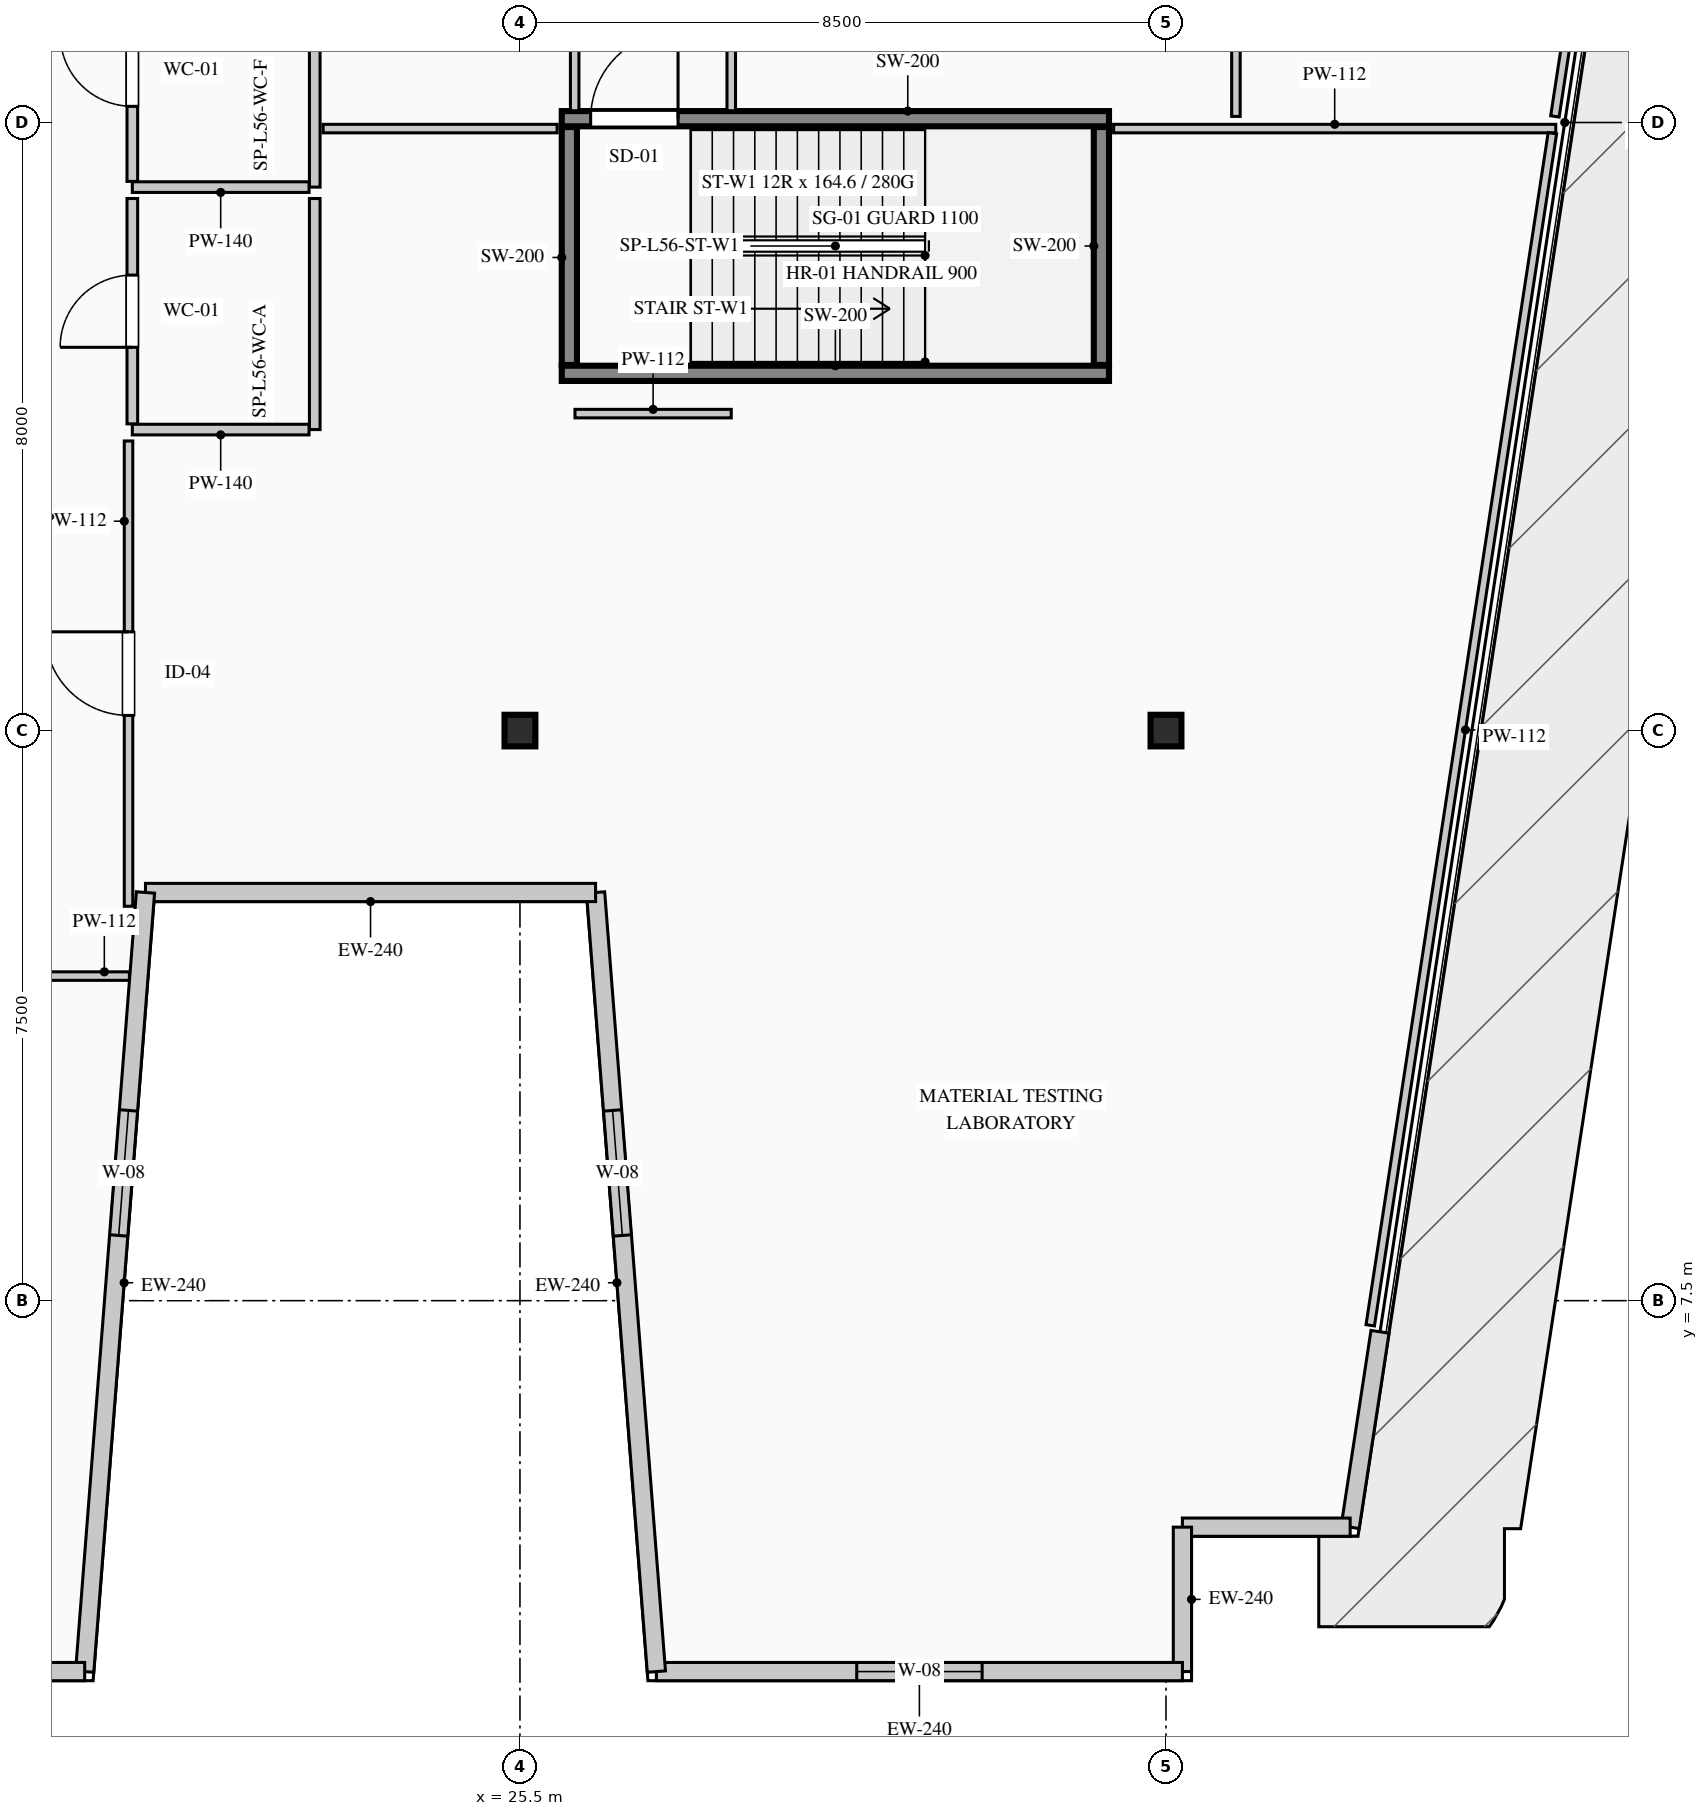
"""IFC4 building model, lengths in metres.
Left out: names, types, materials, properties, quantities, classifications, styles, units other than length and angle.
Written with IfcOpenShell. Run it as: python <this file> out.ifc"""

import sys

from ifc_helpers import new_model, si_unit, direction, frame, frame_2d, origin, origin_2d, place, context, subcontext, project, spatial, rectangle, i_section, extrude, element, fill, save


model = new_model("IFC4")
c1 = context("Model", 3, precision=1e-05, world=origin(), true_north=direction((0.0, 1.0)))
c2 = subcontext(c1, "Body", "Model", "MODEL_VIEW")
j1 = project(units=[si_unit("LENGTHUNIT", "METRE"), si_unit("PLANEANGLEUNIT", "RADIAN")], contexts=[c1])
p1 = place(None, origin())
s1 = spatial("IfcSite", under=j1, at=p1, CompositionType="ELEMENT")
p2 = place(p1, origin())
s2 = spatial("IfcBuilding", under=s1, at=p2, CompositionType="ELEMENT")
p3 = place(p2, frame((0.0, 0.0, 235.1)))
s3 = spatial("IfcBuildingStorey", under=s2, at=p3, CompositionType="ELEMENT", Elevation=235.1)
p4 = place(p3, frame((26.05, 19.7, 0.0), z_axis=(0.0, 0.0, 1.0), x_axis=(1.0, 0.0, 0.0)))
e1 = element("IfcWall", 1, at=p4, inside=s3, PredefinedType="SHEAR", context=c2, shape_type="SweptSolid", body=[
    extrude(rectangle(XDim=7.2, YDim=0.2, at=frame_2d((3.6, 0.0))), origin(), (0.0, 0.0, 1.0), 3.95),
])
p5 = place(p3, frame((26.05, 23.05, 0.0), z_axis=(0.0, 0.0, 1.0), x_axis=(1.0, 0.0, 0.0)))
e2 = element("IfcWall", 2, at=p5, inside=s3, PredefinedType="SHEAR", context=c2, shape_type="SweptSolid", body=[
    extrude(rectangle(XDim=7.2, YDim=0.2, at=frame_2d((3.6, 0.0))), origin(), (0.0, 0.0, 1.0), 3.95),
])
p6 = place(p5, frame((0.38, 0.0, 0.0)))
e3 = element("IfcOpeningElement", 3, at=p6, cuts=e2, PredefinedType="OPENING", context=c2, shape_type="SweptSolid", body=[
    extrude(rectangle(XDim=1.15, YDim=2.2, at=frame_2d((0.575, 1.1))), frame((0.0, 0.11, 0.0), z_axis=(0.0, -1.0, 0.0), x_axis=(1.0, 0.0, 0.0)), (0.0, 0.0, 1.0), 0.22),
])
for number, where, z_axis, x_axis in (
    (4, (26.15, 19.81, 0.0), (0.0, 0.0, 1.0), (0.0, 1.0, 0.0)),
    (5, (33.15, 19.81, 0.0), (0.0, 0.0, 1.0), (0.0, 1.0, 0.0)),
):
    element("IfcWall", number, at=place(p3, frame(where, z_axis=z_axis, x_axis=x_axis)), inside=s3, PredefinedType="SHEAR", context=c2, shape_type="SweptSolid", body=[
        extrude(rectangle(XDim=3.13, YDim=0.2, at=frame_2d((1.565, 0.0))), origin(), (0.0, 0.0, 1.0), 3.95),
    ])
for number, where, z_axis, x_axis in (
    (6, (25.5, 15.0, 0.0), (0.0, 0.0, 1.0), (1.0, 0.0, 0.0)),
    (7, (34.0, 15.0, 0.0), (0.0, 0.0, 1.0), (1.0, 0.0, 0.0)),
):
    element("IfcColumn", number, at=place(p3, frame(where, z_axis=z_axis, x_axis=x_axis)), inside=s3, PredefinedType="COLUMN", context=c2, shape_type="SweptSolid", body=[
        extrude(i_section(OverallWidth=0.406, OverallDepth=0.416, WebThickness=0.03, FlangeThickness=0.048, FilletRadius=0.015, at=origin_2d()), origin(), (0.0, 0.0, 1.0), 3.95),
    ])
p7 = place(p3, frame((36.816, 7.09, 0.0), z_axis=(0.0, 0.0, 1.0), x_axis=(-0.151090396132, -0.988519950328, 0.0)))
e8 = element("IfcWall", 8, at=p7, inside=s3, PredefinedType="STANDARD", context=c2, shape_type="SweptSolid", body=[
    extrude(rectangle(XDim=2.6, YDim=0.24, at=frame_2d((1.3, 0.0))), origin(), (0.0, 0.0, 1.0), 3.7),
])
p8 = place(p3, frame((36.423, 4.52, 0.0), z_axis=(0.0, 0.0, 1.0), x_axis=(-1.0, 0.0, 0.0)))
e9 = element("IfcWall", 9, at=p8, inside=s3, PredefinedType="STANDARD", context=c2, shape_type="SweptSolid", body=[
    extrude(rectangle(XDim=2.207, YDim=0.24, at=frame_2d((1.104, 0.0))), origin(), (0.0, 0.0, 1.0), 3.7),
])
p9 = place(p3, frame((34.216, 4.52, 0.0), z_axis=(0.0, 0.0, 1.0), x_axis=(0.0, -1.0, 0.0)))
e10 = element("IfcWall", 10, at=p9, inside=s3, PredefinedType="STANDARD", context=c2, shape_type="SweptSolid", body=[
    extrude(rectangle(XDim=1.9, YDim=0.24, at=frame_2d((0.95, 0.0))), origin(), (0.0, 0.0, 1.0), 3.7),
])
p10 = place(p3, frame((34.216, 2.62, 0.0), z_axis=(0.0, 0.0, 1.0), x_axis=(-1.0, 0.0, 0.0)))
e11 = element("IfcWall", 11, at=p10, inside=s3, PredefinedType="STANDARD", context=c2, shape_type="SweptSolid", body=[
    extrude(rectangle(XDim=6.921, YDim=0.24, at=frame_2d((3.46, 0.0))), origin(), (0.0, 0.0, 1.0), 3.7),
])
p11 = place(p10, frame((2.635, 0.0, 0.9)))
e12 = element("IfcOpeningElement", 12, at=p11, cuts=e11, PredefinedType="OPENING", context=c2, shape_type="SweptSolid", body=[
    extrude(rectangle(XDim=1.65, YDim=1.95, at=frame_2d((0.825, 0.975))), frame((0.0, 0.13, 0.0), z_axis=(0.0, -1.0, 0.0), x_axis=(1.0, 0.0, 0.0)), (0.0, 0.0, 1.0), 0.26),
])
p12 = place(p3, frame((27.295, 2.62, 0.0), z_axis=(0.0, 0.0, 1.0), x_axis=(-0.077793257511, 0.996969512616, 0.0)))
e13 = element("IfcWall", 13, at=p12, inside=s3, PredefinedType="STANDARD", context=c2, shape_type="SweptSolid", body=[
    extrude(rectangle(XDim=10.281, YDim=0.24, at=frame_2d((5.141, 0.0))), origin(), (0.0, 0.0, 1.0), 3.7),
])
p13 = place(p12, frame((5.755, 0.0, 0.9)))
e14 = element("IfcOpeningElement", 14, at=p13, cuts=e13, PredefinedType="OPENING", context=c2, shape_type="SweptSolid", body=[
    extrude(rectangle(XDim=1.65, YDim=1.95, at=frame_2d((0.825, 0.975))), frame((0.0, 0.13, 0.0), z_axis=(0.0, -1.0, 0.0), x_axis=(1.0, 0.0, 0.0)), (0.0, 0.0, 1.0), 0.26),
])
p14 = place(p3, frame((26.495, 12.87, 0.0), z_axis=(0.0, 0.0, 1.0), x_axis=(-1.0, 0.0, 0.0)))
e15 = element("IfcWall", 15, at=p14, inside=s3, PredefinedType="STANDARD", context=c2, shape_type="SweptSolid", body=[
    extrude(rectangle(XDim=5.922, YDim=0.24, at=frame_2d((2.961, 0.0))), origin(), (0.0, 0.0, 1.0), 3.7),
])
p15 = place(p3, frame((20.573, 12.87, 0.0), z_axis=(0.0, 0.0, 1.0), x_axis=(-0.077816860153, -0.996967670627, 0.0)))
e16 = element("IfcWall", 16, at=p15, inside=s3, PredefinedType="STANDARD", context=c2, shape_type="SweptSolid", body=[
    extrude(rectangle(XDim=10.281, YDim=0.24, at=frame_2d((5.141, 0.0))), origin(), (0.0, 0.0, 1.0), 3.7),
])
p16 = place(p15, frame((2.876, 0.0, 0.9)))
e17 = element("IfcOpeningElement", 17, at=p16, cuts=e16, PredefinedType="OPENING", context=c2, shape_type="SweptSolid", body=[
    extrude(rectangle(XDim=1.65, YDim=1.95, at=frame_2d((0.825, 0.975))), frame((0.0, 0.13, 0.0), z_axis=(0.0, -1.0, 0.0), x_axis=(1.0, 0.0, 0.0)), (0.0, 0.0, 1.0), 0.26),
])
p17 = place(p3, frame((19.773, 2.62, 0.0), z_axis=(0.0, 0.0, 1.0), x_axis=(-1.0, 0.0, 0.0)))
e18 = element("IfcWall", 18, at=p17, inside=s3, PredefinedType="STANDARD", context=c2, shape_type="SweptSolid", body=[
    extrude(rectangle(XDim=10.717, YDim=0.24, at=frame_2d((5.358, 0.0))), origin(), (0.0, 0.0, 1.0), 3.7),
])
p18 = place(p17, frame((4.659, 0.0, 0.0)))
e19 = element("IfcOpeningElement", 19, at=p18, cuts=e18, PredefinedType="OPENING", context=c2, shape_type="SweptSolid", body=[
    extrude(rectangle(XDim=1.4, YDim=2.2, at=frame_2d((0.7, 1.1))), frame((0.0, 0.13, 0.0), z_axis=(0.0, -1.0, 0.0), x_axis=(1.0, 0.0, 0.0)), (0.0, 0.0, 1.0), 0.26),
])
p19 = place(p3, frame((22.8, 25.15, 0.0), z_axis=(0.0, 0.0, 1.0), x_axis=(0.0, -1.0, 0.0)))
e20 = element("IfcWall", 20, at=p19, inside=s3, PredefinedType="PARTITIONING", context=c2, shape_type="SweptSolid", body=[
    extrude(rectangle(XDim=3.0, YDim=0.14, at=frame_2d((1.5, 0.0))), origin(), (0.0, 0.0, 1.0), 3.325),
])
p20 = place(p3, frame((22.725, 22.15, 0.0), z_axis=(0.0, 0.0, 1.0), x_axis=(-1.0, 0.0, 0.0)))
e21 = element("IfcWall", 21, at=p20, inside=s3, PredefinedType="PARTITIONING", context=c2, shape_type="SweptSolid", body=[
    extrude(rectangle(XDim=2.325, YDim=0.14, at=frame_2d((1.163, 0.0))), origin(), (0.0, 0.0, 1.0), 3.7),
])
p21 = place(p3, frame((20.4, 22.225, 0.0), z_axis=(0.0, 0.0, 1.0), x_axis=(0.0, 1.0, 0.0)))
e22 = element("IfcWall", 22, at=p21, inside=s3, PredefinedType="PARTITIONING", context=c2, shape_type="SweptSolid", body=[
    extrude(rectangle(XDim=2.925, YDim=0.14, at=frame_2d((1.462, 0.0))), origin(), (0.0, 0.0, 1.0), 3.7),
])
p22 = place(p21, frame((0.988, 0.0, 0.0)))
e23 = element("IfcOpeningElement", 23, at=p22, cuts=e22, PredefinedType="OPENING", context=c2, shape_type="SweptSolid", body=[
    extrude(rectangle(XDim=0.95, YDim=2.15, at=frame_2d((0.475, 1.075))), frame((0.0, 0.08, 0.0), z_axis=(0.0, -1.0, 0.0), x_axis=(1.0, 0.0, 0.0)), (0.0, 0.0, 1.0), 0.16),
])
p23 = place(p3, frame((22.8, 22.0, 0.0), z_axis=(0.0, 0.0, 1.0), x_axis=(0.0, -1.0, 0.0)))
e24 = element("IfcWall", 24, at=p23, inside=s3, PredefinedType="PARTITIONING", context=c2, shape_type="SweptSolid", body=[
    extrude(rectangle(XDim=3.04, YDim=0.14, at=frame_2d((1.52, 0.0))), origin(), (0.0, 0.0, 1.0), 3.325),
])
p24 = place(p3, frame((22.725, 18.96, 0.0), z_axis=(0.0, 0.0, 1.0), x_axis=(-1.0, 0.0, 0.0)))
e25 = element("IfcWall", 25, at=p24, inside=s3, PredefinedType="PARTITIONING", context=c2, shape_type="SweptSolid", body=[
    extrude(rectangle(XDim=2.325, YDim=0.14, at=frame_2d((1.163, 0.0))), origin(), (0.0, 0.0, 1.0), 3.7),
])
p25 = place(p3, frame((20.4, 19.035, 0.0), z_axis=(0.0, 0.0, 1.0), x_axis=(0.0, 1.0, 0.0)))
e26 = element("IfcWall", 26, at=p25, inside=s3, PredefinedType="PARTITIONING", context=c2, shape_type="SweptSolid", body=[
    extrude(rectangle(XDim=2.965, YDim=0.14, at=frame_2d((1.482, 0.0))), origin(), (0.0, 0.0, 1.0), 3.7),
])
p26 = place(p25, frame((1.008, 0.0, 0.0)))
e27 = element("IfcOpeningElement", 27, at=p26, cuts=e26, PredefinedType="OPENING", context=c2, shape_type="SweptSolid", body=[
    extrude(rectangle(XDim=0.95, YDim=2.15, at=frame_2d((0.475, 1.075))), frame((0.0, 0.08, 0.0), z_axis=(0.0, -1.0, 0.0), x_axis=(1.0, 0.0, 0.0)), (0.0, 0.0, 1.0), 0.16),
])
p27 = place(p3, frame((17.141, 11.77, 0.0), z_axis=(0.0, 0.0, 1.0), x_axis=(1.0, 0.0, 0.0)))
e28 = element("IfcWall", 28, at=p27, inside=s3, PredefinedType="PARTITIONING", context=c2, shape_type="SweptSolid", body=[
    extrude(rectangle(XDim=3.221, YDim=0.112, at=frame_2d((1.61, 0.0))), origin(), (0.0, 0.0, 1.0), 3.7),
])
p28 = place(p27, frame((1.06, 0.0, 0.0)))
e29 = element("IfcOpeningElement", 29, at=p28, cuts=e28, PredefinedType="OPENING", context=c2, shape_type="SweptSolid", body=[
    extrude(rectangle(XDim=1.1, YDim=2.2, at=frame_2d((0.55, 1.1))), frame((0.0, 0.066, 0.0), z_axis=(0.0, -1.0, 0.0), x_axis=(1.0, 0.0, 0.0)), (0.0, 0.0, 1.0), 0.132),
])
p29 = place(p3, frame((33.311, 22.92, 0.0), z_axis=(0.0, 0.0, 1.0), x_axis=(1.0, 0.0, 0.0)))
e30 = element("IfcWall", 30, at=p29, inside=s3, PredefinedType="PARTITIONING", context=c2, shape_type="SweptSolid", body=[
    extrude(rectangle(XDim=5.817, YDim=0.112, at=frame_2d((2.909, 0.0))), origin(), (0.0, 0.0, 1.0), 3.7),
])
p30 = place(p3, frame((39.084, 22.859, 0.0), z_axis=(0.0, 0.0, 1.0), x_axis=(-0.151051087355, -0.988525957681, 0.0)))
e31 = element("IfcWall", 31, at=p30, inside=s3, PredefinedType="PARTITIONING", context=c2, shape_type="SweptSolid", body=[
    extrude(rectangle(XDim=15.865, YDim=0.112, at=frame_2d((7.933, 0.0))), origin(), (0.0, 0.0, 1.0), 3.7),
])
p31 = place(p3, frame((20.35, 12.689, 0.0), z_axis=(0.0, 0.0, 1.0), x_axis=(0.0, 1.0, 0.0)))
e32 = element("IfcWall", 32, at=p31, inside=s3, PredefinedType="PARTITIONING", context=c2, shape_type="SweptSolid", body=[
    extrude(rectangle(XDim=6.121, YDim=0.112, at=frame_2d((3.061, 0.0))), origin(), (0.0, 0.0, 1.0), 3.7),
])
p32 = place(p31, frame((2.511, 0.0, 0.0)))
e33 = element("IfcOpeningElement", 33, at=p32, cuts=e32, PredefinedType="OPENING", context=c2, shape_type="SweptSolid", body=[
    extrude(rectangle(XDim=1.1, YDim=2.2, at=frame_2d((0.55, 1.1))), frame((0.0, 0.066, 0.0), z_axis=(0.0, -1.0, 0.0), x_axis=(1.0, 0.0, 0.0)), (0.0, 0.0, 1.0), 0.132),
])
p33 = place(p3, frame((22.91, 22.92, 0.0), z_axis=(0.0, 0.0, 1.0), x_axis=(1.0, 0.0, 0.0)))
e34 = element("IfcWall", 34, at=p33, inside=s3, PredefinedType="PARTITIONING", context=c2, shape_type="SweptSolid", body=[
    extrude(rectangle(XDim=3.079, YDim=0.112, at=frame_2d((1.54, 0.0))), origin(), (0.0, 0.0, 1.0), 3.7),
])
p34 = place(p3, frame((26.224, 19.17, 0.0), z_axis=(0.0, 0.0, 1.0), x_axis=(1.0, 0.0, 0.0)))
e35 = element("IfcWall", 35, at=p34, inside=s3, PredefinedType="PARTITIONING", context=c2, shape_type="SweptSolid", body=[
    extrude(rectangle(XDim=2.056, YDim=0.112, at=frame_2d((1.028, 0.0))), origin(), (0.0, 0.0, 1.0), 3.7),
])
p35 = place(p3, frame((26.22, 28.959, 0.0), z_axis=(0.0, 0.0, 1.0), x_axis=(0.0, -1.0, 0.0)))
e36 = element("IfcWall", 36, at=p35, inside=s3, PredefinedType="PARTITIONING", context=c2, shape_type="SweptSolid", body=[
    extrude(rectangle(XDim=5.804, YDim=0.112, at=frame_2d((2.902, 0.0))), origin(), (0.0, 0.0, 1.0), 3.7),
])
p36 = place(p35, frame((2.352, 0.0, 0.0)))
e37 = element("IfcOpeningElement", 37, at=p36, cuts=e36, PredefinedType="OPENING", context=c2, shape_type="SweptSolid", body=[
    extrude(rectangle(XDim=1.1, YDim=2.2, at=frame_2d((0.55, 1.1))), frame((0.0, 0.066, 0.0), z_axis=(0.0, -1.0, 0.0), x_axis=(1.0, 0.0, 0.0)), (0.0, 0.0, 1.0), 0.132),
])
p37 = place(p3, frame((28.28, 23.155, 0.0), z_axis=(0.0, 0.0, 1.0), x_axis=(0.0, 1.0, 0.0)))
e38 = element("IfcWall", 38, at=p37, inside=s3, PredefinedType="PARTITIONING", context=c2, shape_type="SweptSolid", body=[
    extrude(rectangle(XDim=5.865, YDim=0.112, at=frame_2d((2.933, 0.0))), origin(), (0.0, 0.0, 1.0), 3.7),
])
p38 = place(p3, frame((34.92, 28.959, 0.0), z_axis=(0.0, 0.0, 1.0), x_axis=(0.0, -1.0, 0.0)))
e39 = element("IfcWall", 39, at=p38, inside=s3, PredefinedType="PARTITIONING", context=c2, shape_type="SweptSolid", body=[
    extrude(rectangle(XDim=5.879, YDim=0.112, at=frame_2d((2.939, 0.0))), origin(), (0.0, 0.0, 1.0), 3.7),
])
p39 = place(p3, frame((41.529, 38.867, 0.0), z_axis=(0.0, 0.0, 1.0), x_axis=(-0.151041582551, -0.98852741001, 0.0)))
e40 = element("IfcWall", 40, at=p39, inside=s3, PredefinedType="PARTITIONING", context=c2, shape_type="SweptSolid", body=[
    extrude(rectangle(XDim=15.97, YDim=0.112, at=frame_2d((7.985, 0.0))), origin(), (0.0, 0.0, 1.0), 3.7),
])
p40 = place(p11, origin())
e41 = element("IfcWindow", 41, at=p40, inside=s3, PartitioningType="SINGLE_PANEL", PredefinedType="WINDOW", context=c2, shape_type="SweptSolid", body=[
    extrude(rectangle(XDim=1.65, YDim=1.95, at=frame_2d((0.825, 0.975))), frame((0.0, 0.03, 0.0), z_axis=(0.0, -1.0, 0.0), x_axis=(1.0, 0.0, 0.0)), (0.0, 0.0, 1.0), 0.06),
])
fill(e12, e41)
p41 = place(p13, origin())
e42 = element("IfcWindow", 42, at=p41, inside=s3, PartitioningType="SINGLE_PANEL", PredefinedType="WINDOW", context=c2, shape_type="SweptSolid", body=[
    extrude(rectangle(XDim=1.65, YDim=1.95, at=frame_2d((0.825, 0.975))), frame((0.0, 0.03, 0.0), z_axis=(0.0, -1.0, 0.0), x_axis=(1.0, 0.0, 0.0)), (0.0, 0.0, 1.0), 0.06),
])
fill(e14, e42)
p42 = place(p16, origin())
e43 = element("IfcWindow", 43, at=p42, inside=s3, PartitioningType="SINGLE_PANEL", PredefinedType="WINDOW", context=c2, shape_type="SweptSolid", body=[
    extrude(rectangle(XDim=1.65, YDim=1.95, at=frame_2d((0.825, 0.975))), frame((0.0, 0.03, 0.0), z_axis=(0.0, -1.0, 0.0), x_axis=(1.0, 0.0, 0.0)), (0.0, 0.0, 1.0), 0.06),
])
fill(e17, e43)
p43 = place(p6, origin())
e44 = element("IfcDoor", 44, at=p43, inside=s3, OperationType="SINGLE_SWING_RIGHT", PredefinedType="DOOR", context=c2, shape_type="SweptSolid", body=[
    extrude(rectangle(XDim=1.15, YDim=2.2, at=frame_2d((0.575, 1.1))), frame((0.0, 0.025, 0.0), z_axis=(0.0, -1.0, 0.0), x_axis=(1.0, 0.0, 0.0)), (0.0, 0.0, 1.0), 0.05),
])
fill(e3, e44)
p44 = place(p22, origin())
e45 = element("IfcDoor", 45, at=p44, inside=s3, OperationType="SINGLE_SWING_RIGHT", PredefinedType="DOOR", context=c2, shape_type="SweptSolid", body=[
    extrude(rectangle(XDim=0.95, YDim=2.15, at=frame_2d((0.475, 1.075))), frame((0.0, 0.025, 0.0), z_axis=(0.0, -1.0, 0.0), x_axis=(1.0, 0.0, 0.0)), (0.0, 0.0, 1.0), 0.05),
])
fill(e23, e45)
p45 = place(p26, origin())
e46 = element("IfcDoor", 46, at=p45, inside=s3, OperationType="SINGLE_SWING_LEFT", PredefinedType="DOOR", context=c2, shape_type="SweptSolid", body=[
    extrude(rectangle(XDim=0.95, YDim=2.15, at=frame_2d((0.475, 1.075))), frame((0.0, 0.025, 0.0), z_axis=(0.0, -1.0, 0.0), x_axis=(1.0, 0.0, 0.0)), (0.0, 0.0, 1.0), 0.05),
])
fill(e27, e46)
p46 = place(p32, origin())
e47 = element("IfcDoor", 47, at=p46, inside=s3, OperationType="SINGLE_SWING_RIGHT", PredefinedType="DOOR", context=c2, shape_type="SweptSolid", body=[
    extrude(rectangle(XDim=1.1, YDim=2.2, at=frame_2d((0.55, 1.1))), frame((0.0, 0.025, 0.0), z_axis=(0.0, -1.0, 0.0), x_axis=(1.0, 0.0, 0.0)), (0.0, 0.0, 1.0), 0.05),
])
fill(e33, e47)
save(model, sys.argv[1])
